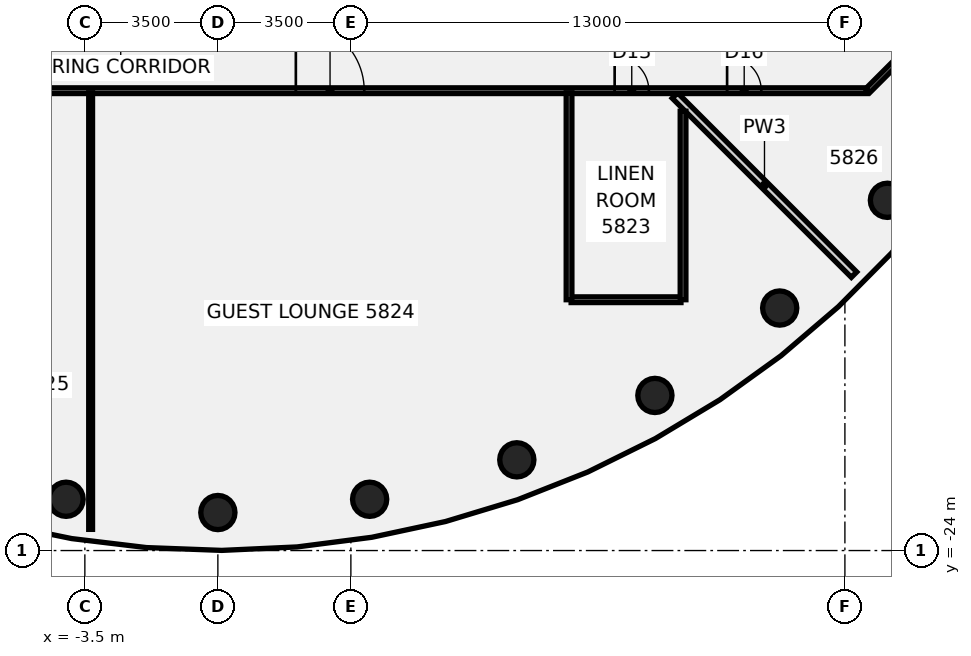
"""IFC4 building model, lengths in metres.
Left out: names, types, materials, properties, quantities, classifications, styles, units other than length and angle.
Written with IfcOpenShell. Run it as: python <this file> out.ifc"""

import sys

from ifc_helpers import new_model, si_unit, direction, frame, frame_2d, origin, origin_2d, place, context, subcontext, project, spatial, rectangle, circle, extrude, element, fill, save


model = new_model("IFC4")
c1 = context("Model", 3, precision=1e-05, world=origin(), true_north=direction((0.0, 1.0)))
c2 = subcontext(c1, "Body", "Model", "MODEL_VIEW")
j1 = project(units=[si_unit("LENGTHUNIT", "METRE"), si_unit("PLANEANGLEUNIT", "RADIAN")], contexts=[c1])
p1 = place(None, origin())
s1 = spatial("IfcSite", under=j1, at=p1, CompositionType="ELEMENT")
p2 = place(p1, origin())
s2 = spatial("IfcBuilding", under=s1, at=p2, CompositionType="ELEMENT")
p3 = place(p2, frame((0.0, 0.0, 230.7)))
s3 = spatial("IfcBuildingStorey", under=s2, at=p3, CompositionType="ELEMENT", Elevation=230.7)
for number, where, z_axis, x_axis in (
    (1, (-3.994, -22.651, -0.14), (0.0, 0.0, 1.0), (1.0, 0.0, 0.0)),
    (2, (0.0, -23.0, -0.14), (0.0, 0.0, 1.0), (1.0, 0.0, 0.0)),
    (3, (3.994, -22.651, -0.14), (0.0, 0.0, 1.0), (1.0, 0.0, 0.0)),
    (4, (7.866, -21.613, -0.14), (0.0, 0.0, 1.0), (1.0, 0.0, 0.0)),
    (5, (11.5, -19.919, -0.14), (0.0, 0.0, 1.0), (1.0, 0.0, 0.0)),
    (6, (14.784, -17.619, -0.14), (0.0, 0.0, 1.0), (1.0, 0.0, 0.0)),
    (7, (17.619, -14.784, -0.14), (0.0, 0.0, 1.0), (1.0, 0.0, 0.0)),
):
    element("IfcColumn", number, at=place(p3, frame(where, z_axis=z_axis, x_axis=x_axis)), inside=s3, PredefinedType="COLUMN", context=c2, shape_type="SweptSolid", body=[
        extrude(circle(Radius=0.45, at=origin_2d()), origin(), (0.0, 0.0, 1.0), 3.6),
    ])
p4 = place(p3, frame((12.027, -12.027, 0.0), z_axis=(0.0, 0.0, 1.0), x_axis=(0.707106781187, -0.707106781187, 0.0)))
e8 = element("IfcWall", 8, at=p4, inside=s3, PredefinedType="PARTITIONING", context=c2, shape_type="SweptSolid", body=[
    extrude(rectangle(XDim=6.665, YDim=0.2, at=frame_2d((3.333, 0.0))), origin(), (0.0, 0.0, 1.0), 2.864),
])
p5 = place(p3, frame((-17.1, -11.9, 0.0), z_axis=(0.0, 0.0, 1.0), x_axis=(1.0, 0.0, 0.0)))
e9 = element("IfcWall", 9, at=p5, inside=s3, PredefinedType="PARTITIONING", context=c2, shape_type="SweptSolid", body=[
    extrude(rectangle(XDim=34.165, YDim=0.15, at=frame_2d((17.083, 0.0))), origin(), (0.0, 0.0, 1.0), 2.864),
])
p6 = place(p5, frame((6.1, 0.0, 0.0)))
e10 = element("IfcOpeningElement", 10, at=p6, cuts=e9, PredefinedType="OPENING", context=c2, shape_type="SweptSolid", body=[
    extrude(rectangle(XDim=0.9, YDim=2.1, at=frame_2d((0.45, 1.05))), frame((0.0, 0.085, 0.0), z_axis=(0.0, -1.0, 0.0), x_axis=(1.0, 0.0, 0.0)), (0.0, 0.0, 1.0), 0.17),
])
p7 = place(p5, frame((27.541, 0.0, 0.0)))
e11 = element("IfcOpeningElement", 11, at=p7, cuts=e9, PredefinedType="OPENING", context=c2, shape_type="SweptSolid", body=[
    extrude(rectangle(XDim=0.9, YDim=2.1, at=frame_2d((0.45, 1.05))), frame((0.0, 0.085, 0.0), z_axis=(0.0, -1.0, 0.0), x_axis=(1.0, 0.0, 0.0)), (0.0, 0.0, 1.0), 0.17),
])
p8 = place(p5, frame((19.152, 0.0, 0.0)))
e12 = element("IfcOpeningElement", 12, at=p8, cuts=e9, PredefinedType="OPENING", context=c2, shape_type="SweptSolid", body=[
    extrude(rectangle(XDim=1.8, YDim=2.1, at=frame_2d((0.9, 1.05))), frame((0.0, 0.085, 0.0), z_axis=(0.0, -1.0, 0.0), x_axis=(1.0, 0.0, 0.0)), (0.0, 0.0, 1.0), 0.17),
])
p9 = place(p5, frame((10.359, 0.0, 0.0)))
e13 = element("IfcOpeningElement", 13, at=p9, cuts=e9, PredefinedType="OPENING", context=c2, shape_type="SweptSolid", body=[
    extrude(rectangle(XDim=1.8, YDim=2.1, at=frame_2d((0.9, 1.05))), frame((0.0, 0.085, 0.0), z_axis=(0.0, -1.0, 0.0), x_axis=(1.0, 0.0, 0.0)), (0.0, 0.0, 1.0), 0.17),
])
p10 = place(p5, frame((30.5, 0.0, 0.0)))
e14 = element("IfcOpeningElement", 14, at=p10, cuts=e9, PredefinedType="OPENING", context=c2, shape_type="SweptSolid", body=[
    extrude(rectangle(XDim=0.9, YDim=2.1, at=frame_2d((0.45, 1.05))), frame((0.0, 0.085, 0.0), z_axis=(0.0, -1.0, 0.0), x_axis=(1.0, 0.0, 0.0)), (0.0, 0.0, 1.0), 0.17),
])
p11 = place(p5, frame((1.65, 0.0, 0.0)))
e15 = element("IfcOpeningElement", 15, at=p11, cuts=e9, PredefinedType="OPENING", context=c2, shape_type="SweptSolid", body=[
    extrude(rectangle(XDim=0.9, YDim=2.1, at=frame_2d((0.45, 1.05))), frame((0.0, 0.085, 0.0), z_axis=(0.0, -1.0, 0.0), x_axis=(1.0, 0.0, 0.0)), (0.0, 0.0, 1.0), 0.17),
])
p12 = place(p3, frame((9.296, -17.4, 0.0), z_axis=(0.0, 0.0, 1.0), x_axis=(1.0, 0.0, 0.0)))
e16 = element("IfcWall", 16, at=p12, inside=s3, PredefinedType="PARTITIONING", context=c2, shape_type="SweptSolid", body=[
    extrude(rectangle(XDim=2.89, YDim=0.15, at=frame_2d((1.445, 0.0))), origin(), (0.0, 0.0, 1.0), 2.864),
])
p13 = place(p3, frame((17.1, -11.9, 0.0), z_axis=(0.0, 0.0, 1.0), x_axis=(0.707106781187, 0.707106781187, 0.0)))
e17 = element("IfcWall", 17, at=p13, inside=s3, PredefinedType="PARTITIONING", context=c2, shape_type="SweptSolid", body=[
    extrude(rectangle(XDim=2.505, YDim=0.15, at=frame_2d((1.253, 0.0))), origin(), (0.0, 0.0, 1.0), 2.864),
])
p14 = place(p3, frame((-3.348, -23.442, 0.0), z_axis=(0.0, 0.0, 1.0), x_axis=(0.0, 1.0, 0.0)))
e18 = element("IfcWall", 18, at=p14, inside=s3, PredefinedType="PARTITIONING", context=c2, shape_type="SweptSolid", body=[
    extrude(rectangle(XDim=11.487, YDim=0.1, at=frame_2d((5.744, 0.0))), origin(), (0.0, 0.0, 1.0), 2.864),
])
p15 = place(p3, frame((9.241, -17.4, 0.0), z_axis=(0.0, 0.0, 1.0), x_axis=(0.0, 1.0, 0.0)))
e19 = element("IfcWall", 19, at=p15, inside=s3, PredefinedType="PARTITIONING", context=c2, shape_type="SweptSolid", body=[
    extrude(rectangle(XDim=5.445, YDim=0.15, at=frame_2d((2.722, 0.0))), origin(), (0.0, 0.0, 1.0), 2.864),
])
p16 = place(p3, frame((12.241, -17.4, 0.0), z_axis=(0.0, 0.0, 1.0), x_axis=(0.0, 1.0, 0.0)))
e20 = element("IfcWall", 20, at=p16, inside=s3, PredefinedType="PARTITIONING", context=c2, shape_type="SweptSolid", body=[
    extrude(rectangle(XDim=4.959, YDim=0.15, at=frame_2d((2.479, 0.0))), origin(), (0.0, 0.0, 1.0), 2.864),
])
p17 = place(p7, frame((0.9, 0.0, 0.0), z_axis=(0.0, 0.0, 1.0), x_axis=(-1.0, 0.0, 0.0)))
e21 = element("IfcDoor", 21, at=p17, inside=s3, OperationType="SINGLE_SWING_RIGHT", PredefinedType="DOOR", context=c2, shape_type="SweptSolid", body=[
    extrude(rectangle(XDim=0.9, YDim=2.1, at=frame_2d((0.45, 1.05))), frame((0.0, 0.025, 0.0), z_axis=(0.0, -1.0, 0.0), x_axis=(1.0, 0.0, 0.0)), (0.0, 0.0, 1.0), 0.05),
])
fill(e11, e21)
p18 = place(p8, origin())
e22 = element("IfcDoor", 22, at=p18, inside=s3, OperationType="DOUBLE_DOOR_SINGLE_SWING", PredefinedType="DOOR", context=c2, shape_type="SweptSolid", body=[
    extrude(rectangle(XDim=1.8, YDim=2.1, at=frame_2d((0.9, 1.05))), frame((0.0, 0.025, 0.0), z_axis=(0.0, -1.0, 0.0), x_axis=(1.0, 0.0, 0.0)), (0.0, 0.0, 1.0), 0.05),
])
fill(e12, e22)
p19 = place(p10, frame((0.9, 0.0, 0.0), z_axis=(0.0, 0.0, 1.0), x_axis=(-1.0, 0.0, 0.0)))
e23 = element("IfcDoor", 23, at=p19, inside=s3, OperationType="SINGLE_SWING_RIGHT", PredefinedType="DOOR", context=c2, shape_type="SweptSolid", body=[
    extrude(rectangle(XDim=0.9, YDim=2.1, at=frame_2d((0.45, 1.05))), frame((0.0, 0.025, 0.0), z_axis=(0.0, -1.0, 0.0), x_axis=(1.0, 0.0, 0.0)), (0.0, 0.0, 1.0), 0.05),
])
fill(e14, e23)
save(model, sys.argv[1])
